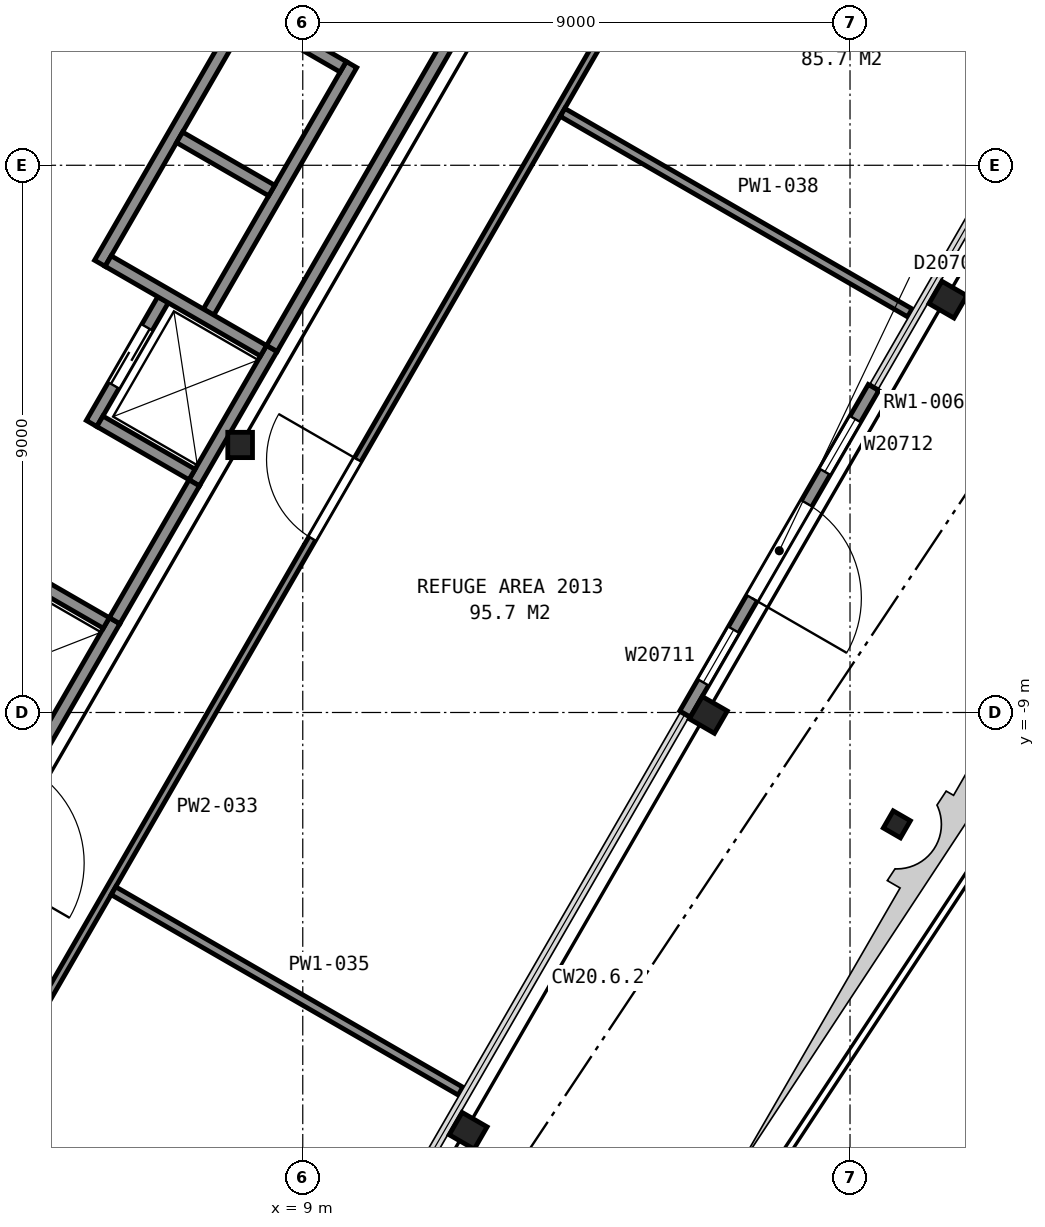
"""IFC4 building model, lengths in metres.
Left out: names, types, materials, properties, quantities, classifications, styles, units other than length and angle.
Written with IfcOpenShell. Run it as: python <this file> out.ifc"""

import sys

from ifc_helpers import new_model, si_unit, direction, frame, frame_2d, origin, origin_2d, place, context, subcontext, project, spatial, rectangle, hollow_circle, i_section, extrude, element, fill, save


model = new_model("IFC4")
c1 = context("Model", 3, precision=1e-05, world=origin(), true_north=direction((0.0, 1.0)))
c2 = subcontext(c1, "Body", "Model", "MODEL_VIEW")
j1 = project(units=[si_unit("LENGTHUNIT", "METRE"), si_unit("PLANEANGLEUNIT", "RADIAN")], contexts=[c1])
p1 = place(None, origin())
s1 = spatial("IfcSite", under=j1, at=p1, CompositionType="ELEMENT")
p2 = place(p1, origin())
s2 = spatial("IfcBuilding", under=s1, at=p2, CompositionType="ELEMENT")
p3 = place(p2, frame((0.0, 0.0, 87.2)))
s3 = spatial("IfcBuildingStorey", under=s2, at=p3, CompositionType="ELEMENT", Elevation=87.2)
for number, where, z_axis, x_axis in (
    (1, (11.72, -15.88, -0.16), (0.0, 0.0, 1.0), (-0.5, -0.866, 0.0)),
    (2, (15.67, -9.04, -0.16), (0.0, 0.0, 1.0), (-0.5, -0.866, 0.0)),
    (3, (19.61, -2.21, -0.16), (0.0, 0.0, 1.0), (-0.5, -0.866, 0.0)),
):
    element("IfcColumn", number, at=place(p3, frame(where, z_axis=z_axis, x_axis=x_axis)), inside=s3, PredefinedType="COLUMN", context=c2, shape_type="SweptSolid", body=[
        extrude(i_section(OverallWidth=0.424, OverallDepth=0.475, WebThickness=0.048, FlangeThickness=0.077, FilletRadius=0.015, at=origin_2d()), origin(), (0.0, 0.0, 1.0), 5.76),
    ])
p4 = place(p3, frame((7.97, -4.6, 0.0), z_axis=(0.0, 0.0, 1.0), x_axis=(1.0, 0.0, 0.0)))
e4 = element("IfcColumn", 4, at=p4, inside=s3, PredefinedType="COLUMN", context=c2, shape_type="SweptSolid", body=[
    extrude(i_section(OverallWidth=0.406, OverallDepth=0.417, WebThickness=0.03, FlangeThickness=0.048, FilletRadius=0.015, at=origin_2d()), origin(), (0.0, 0.0, 1.0), 5.6),
])
p5 = place(p3, frame((18.77, -10.84, -0.73), z_axis=(0.0, 0.0, 1.0), x_axis=(-0.5, -0.866025403784, 0.0)))
e5 = element("IfcColumn", 5, at=p5, inside=s3, PredefinedType="COLUMN", context=c2, shape_type="SweptSolid", body=[
    extrude(hollow_circle(Radius=0.163, WallThickness=0.013, at=origin_2d()), origin(), (0.0, 0.0, 1.0), 5.17),
])
p6 = place(p3, frame((15.287, -9.025, 0.0), z_axis=(0.0, 0.0, 1.0), x_axis=(0.49998037582, 0.866036733513, 0.0)))
e6 = element("IfcWall", 6, at=p6, inside=s3, PredefinedType="SOLIDWALL", context=c2, shape_type="SweptSolid", body=[
    extrude(rectangle(XDim=6.2, YDim=0.2, at=frame_2d((3.1, 0.0))), origin(), (0.0, 0.0, 1.0), 4.323),
])
p7 = place(p6, frame((0.6, 0.0, 0.9)))
e7 = element("IfcOpeningElement", 7, at=p7, cuts=e6, PredefinedType="OPENING", context=c2, shape_type="SweptSolid", body=[
    extrude(rectangle(XDim=1.0, YDim=1.5, at=frame_2d((0.5, 0.75))), frame((0.0, 0.11, 0.0), z_axis=(0.0, -1.0, 0.0), x_axis=(1.0, 0.0, 0.0)), (0.0, 0.0, 1.0), 0.22),
])
p8 = place(p6, frame((2.2, 0.0, 0.0)))
e8 = element("IfcOpeningElement", 8, at=p8, cuts=e6, PredefinedType="OPENING", context=c2, shape_type="SweptSolid", body=[
    extrude(rectangle(XDim=1.8, YDim=2.4, at=frame_2d((0.9, 1.2))), frame((0.0, 0.11, 0.0), z_axis=(0.0, -1.0, 0.0), x_axis=(1.0, 0.0, 0.0)), (0.0, 0.0, 1.0), 0.22),
])
p9 = place(p6, frame((4.6, 0.0, 0.9)))
e9 = element("IfcOpeningElement", 9, at=p9, cuts=e6, PredefinedType="OPENING", context=c2, shape_type="SweptSolid", body=[
    extrude(rectangle(XDim=1.0, YDim=1.5, at=frame_2d((0.5, 0.75))), frame((0.0, 0.11, 0.0), z_axis=(0.0, -1.0, 0.0), x_axis=(1.0, 0.0, 0.0)), (0.0, 0.0, 1.0), 0.22),
])
p10 = place(p3, frame((4.63, -9.7, 0.0), z_axis=(0.0, 0.0, 1.0), x_axis=(0.500062241894, 0.865989465428, 0.0)))
e10 = element("IfcWall", 10, at=p10, inside=s3, PredefinedType="PARTITIONING", context=c2, shape_type="SweptSolid", body=[
    extrude(rectangle(XDim=2.55, YDim=0.2, at=frame_2d((1.275, 0.0))), origin(), (0.0, 0.0, 1.0), 5.6),
])
p11 = place(p3, frame((7.216, -5.222, 0.0), z_axis=(0.0, 0.0, 1.0), x_axis=(0.499990435942, 0.866030925526, 0.0)))
e11 = element("IfcWall", 11, at=p11, inside=s3, PredefinedType="PARTITIONING", context=c2, shape_type="SweptSolid", body=[
    extrude(rectangle(XDim=2.55, YDim=0.2, at=frame_2d((1.275, 0.0))), origin(), (0.0, 0.0, 1.0), 5.6),
])
p12 = place(p3, frame((7.451, -2.414, 0.0), z_axis=(0.0, 0.0, 1.0), x_axis=(0.500016218704, 0.866016039709, 0.0)))
e12 = element("IfcWall", 12, at=p12, inside=s3, PredefinedType="PARTITIONING", context=c2, shape_type="SweptSolid", body=[
    extrude(rectangle(XDim=4.7, YDim=0.2, at=frame_2d((2.35, 0.0))), origin(), (0.0, 0.0, 1.0), 5.6),
])
p13 = place(p3, frame((5.527, -4.247, 0.0), z_axis=(0.0, 0.0, 1.0), x_axis=(0.499938297808, 0.866061024631, 0.0)))
e13 = element("IfcWall", 13, at=p13, inside=s3, PredefinedType="PARTITIONING", context=c2, shape_type="SweptSolid", body=[
    extrude(rectangle(XDim=2.35, YDim=0.2, at=frame_2d((1.175, 0.0))), origin(), (0.0, 0.0, 1.0), 5.6),
])
p14 = place(p13, frame((0.725, 0.0, 0.0)))
e14 = element("IfcOpeningElement", 14, at=p14, cuts=e13, PredefinedType="OPENING", context=c2, shape_type="SweptSolid", body=[
    extrude(rectangle(XDim=1.1, YDim=2.1, at=frame_2d((0.55, 1.05))), frame((0.0, 0.11, 0.0), z_axis=(0.0, -1.0, 0.0), x_axis=(1.0, 0.0, 0.0)), (0.0, 0.0, 1.0), 0.22),
])
p15 = place(p3, frame((5.663, -1.612, 0.0), z_axis=(0.0, 0.0, 1.0), x_axis=(0.49998122708, 0.866036242063, 0.0)))
e15 = element("IfcWall", 15, at=p15, inside=s3, PredefinedType="PARTITIONING", context=c2, shape_type="SweptSolid", body=[
    extrude(rectangle(XDim=4.9, YDim=0.2, at=frame_2d((2.45, 0.0))), origin(), (0.0, 0.0, 1.0), 5.6),
])
p16 = place(p3, frame((9.665, 1.62, 0.0), z_axis=(0.0, 0.0, 1.0), x_axis=(-0.866002029911, 0.500040482552, 0.0)))
e16 = element("IfcWall", 16, at=p16, inside=s3, PredefinedType="PARTITIONING", context=c2, shape_type="SweptSolid", body=[
    extrude(rectangle(XDim=1.75, YDim=0.2, at=frame_2d((0.875, 0.0))), origin(), (0.0, 0.0, 1.0), 5.6),
])
p17 = place(p3, frame((8.49, -0.416, 0.0), z_axis=(0.0, 0.0, 1.0), x_axis=(-0.866036909293, 0.499980071345, 0.0)))
e17 = element("IfcWall", 17, at=p17, inside=s3, PredefinedType="PARTITIONING", context=c2, shape_type="SweptSolid", body=[
    extrude(rectangle(XDim=1.75, YDim=0.2, at=frame_2d((0.875, 0.0))), origin(), (0.0, 0.0, 1.0), 5.6),
])
p18 = place(p3, frame((8.354, -3.051, 0.0), z_axis=(0.0, 0.0, 1.0), x_axis=(-0.866060182126, 0.499939757307, 0.0)))
e18 = element("IfcWall", 18, at=p18, inside=s3, PredefinedType="PARTITIONING", context=c2, shape_type="SweptSolid", body=[
    extrude(rectangle(XDim=2.95, YDim=0.2, at=frame_2d((1.475, 0.0))), origin(), (0.0, 0.0, 1.0), 5.6),
])
p19 = place(p3, frame((7.179, -5.086, 0.0), z_axis=(0.0, 0.0, 1.0), x_axis=(-0.866036909293, 0.499980071345, 0.0)))
e19 = element("IfcWall", 19, at=p19, inside=s3, PredefinedType="PARTITIONING", context=c2, shape_type="SweptSolid", body=[
    extrude(rectangle(XDim=1.75, YDim=0.2, at=frame_2d((0.875, 0.0))), origin(), (0.0, 0.0, 1.0), 5.6),
])
p20 = place(p3, frame((5.769, -7.528, 0.0), z_axis=(0.0, 0.0, 1.0), x_axis=(-0.866002029911, 0.500040482552, 0.0)))
e20 = element("IfcWall", 20, at=p20, inside=s3, PredefinedType="PARTITIONING", context=c2, shape_type="SweptSolid", body=[
    extrude(rectangle(XDim=1.75, YDim=0.2, at=frame_2d((0.875, 0.0))), origin(), (0.0, 0.0, 1.0), 5.6),
])
p21 = place(p3, frame((5.906, -7.49, 0.0), z_axis=(0.0, 0.0, 1.0), x_axis=(0.500252727967, 0.865879442048, 0.0)))
e21 = element("IfcWall", 21, at=p21, inside=s3, PredefinedType="PARTITIONING", context=c2, shape_type="SweptSolid", body=[
    extrude(rectangle(XDim=2.617, YDim=0.2, at=frame_2d((1.309, 0.0))), origin(), (0.0, 0.0, 1.0), 5.35),
])
p22 = place(p3, frame((8.492, -3.012, 0.0), z_axis=(0.0, 0.0, 1.0), x_axis=(0.499972957231, 0.866041016371, 0.0)))
e22 = element("IfcWall", 22, at=p22, inside=s3, PredefinedType="PARTITIONING", context=c2, shape_type="SweptSolid", body=[
    extrude(rectangle(XDim=10.349, YDim=0.2, at=frame_2d((5.174, 0.0))), origin(), (0.0, 0.0, 1.0), 5.35),
])
p23 = place(p3, frame((14.979, 3.956, 0.0), z_axis=(0.0, 0.0, 1.0), x_axis=(-0.499707610415, -0.866194149191, 0.0)))
e23 = element("IfcWall", 23, at=p23, inside=s3, PredefinedType="PARTITIONING", context=c2, shape_type="SweptSolid", body=[
    extrude(rectangle(XDim=21.833, YDim=0.125, at=frame_2d((10.917, 0.0))), origin(), (0.0, 0.0, 1.0), 4.262),
])
p24 = place(p23, frame((10.156, 0.0, 0.0)))
e24 = element("IfcOpeningElement", 24, at=p24, cuts=e23, PredefinedType="OPENING", context=c2, shape_type="SweptSolid", body=[
    extrude(rectangle(XDim=1.5, YDim=2.1, at=frame_2d((0.75, 1.05))), frame((0.0, 0.073, 0.0), z_axis=(0.0, -1.0, 0.0), x_axis=(1.0, 0.0, 0.0)), (0.0, 0.0, 1.0), 0.145),
])
p25 = place(p3, frame((5.887, -11.932, 0.0), z_axis=(0.0, 0.0, 1.0), x_axis=(0.866071468634, -0.499920204851, 0.0)))
e25 = element("IfcWall", 25, at=p25, inside=s3, PredefinedType="PARTITIONING", context=c2, shape_type="SweptSolid", body=[
    extrude(rectangle(XDim=6.59, YDim=0.15, at=frame_2d((3.295, 0.0))), origin(), (0.0, 0.0, 1.0), 4.262),
])
p26 = place(p3, frame((13.272, 0.87, 0.0), z_axis=(0.0, 0.0, 1.0), x_axis=(0.866070944917, -0.499921112148, 0.0)))
e26 = element("IfcWall", 26, at=p26, inside=s3, PredefinedType="PARTITIONING", context=c2, shape_type="SweptSolid", body=[
    extrude(rectangle(XDim=6.596, YDim=0.15, at=frame_2d((3.298, 0.0))), origin(), (0.0, 0.0, 1.0), 4.262),
])
p27 = place(p7, origin())
e27 = element("IfcWindow", 27, at=p27, inside=s3, PartitioningType="SINGLE_PANEL", PredefinedType="WINDOW", context=c2, shape_type="SweptSolid", body=[
    extrude(rectangle(XDim=1.0, YDim=1.5, at=frame_2d((0.5, 0.75))), frame((0.0, 0.03, 0.0), z_axis=(0.0, -1.0, 0.0), x_axis=(1.0, 0.0, 0.0)), (0.0, 0.0, 1.0), 0.06),
])
fill(e7, e27)
p28 = place(p8, frame((1.8, 0.0, 0.0), z_axis=(0.0, 0.0, 1.0), x_axis=(-1.0, 0.0, 0.0)))
e28 = element("IfcDoor", 28, at=p28, inside=s3, OperationType="DOUBLE_DOOR_SINGLE_SWING", PredefinedType="DOOR", context=c2, shape_type="SweptSolid", body=[
    extrude(rectangle(XDim=1.8, YDim=2.4, at=frame_2d((0.9, 1.2))), frame((0.0, 0.025, 0.0), z_axis=(0.0, -1.0, 0.0), x_axis=(1.0, 0.0, 0.0)), (0.0, 0.0, 1.0), 0.05),
])
fill(e8, e28)
p29 = place(p9, origin())
e29 = element("IfcWindow", 29, at=p29, inside=s3, PartitioningType="SINGLE_PANEL", PredefinedType="WINDOW", context=c2, shape_type="SweptSolid", body=[
    extrude(rectangle(XDim=1.0, YDim=1.5, at=frame_2d((0.5, 0.75))), frame((0.0, 0.03, 0.0), z_axis=(0.0, -1.0, 0.0), x_axis=(1.0, 0.0, 0.0)), (0.0, 0.0, 1.0), 0.06),
])
fill(e9, e29)
p30 = place(p14, origin())
e30 = element("IfcDoor", 30, at=p30, inside=s3, OperationType="SLIDING_TO_LEFT", PredefinedType="DOOR", context=c2, shape_type="SweptSolid", body=[
    extrude(rectangle(XDim=1.1, YDim=2.1, at=frame_2d((0.55, 1.05))), frame((0.0, 0.025, 0.0), z_axis=(0.0, -1.0, 0.0), x_axis=(1.0, 0.0, 0.0)), (0.0, 0.0, 1.0), 0.05),
])
fill(e14, e30)
p31 = place(p24, origin())
e31 = element("IfcDoor", 31, at=p31, inside=s3, OperationType="DOUBLE_DOOR_SINGLE_SWING", PredefinedType="DOOR", context=c2, shape_type="SweptSolid", body=[
    extrude(rectangle(XDim=1.5, YDim=2.1, at=frame_2d((0.75, 1.05))), frame((0.0, 0.025, 0.0), z_axis=(0.0, -1.0, 0.0), x_axis=(1.0, 0.0, 0.0)), (0.0, 0.0, 1.0), 0.05),
])
fill(e24, e31)
save(model, sys.argv[1])
